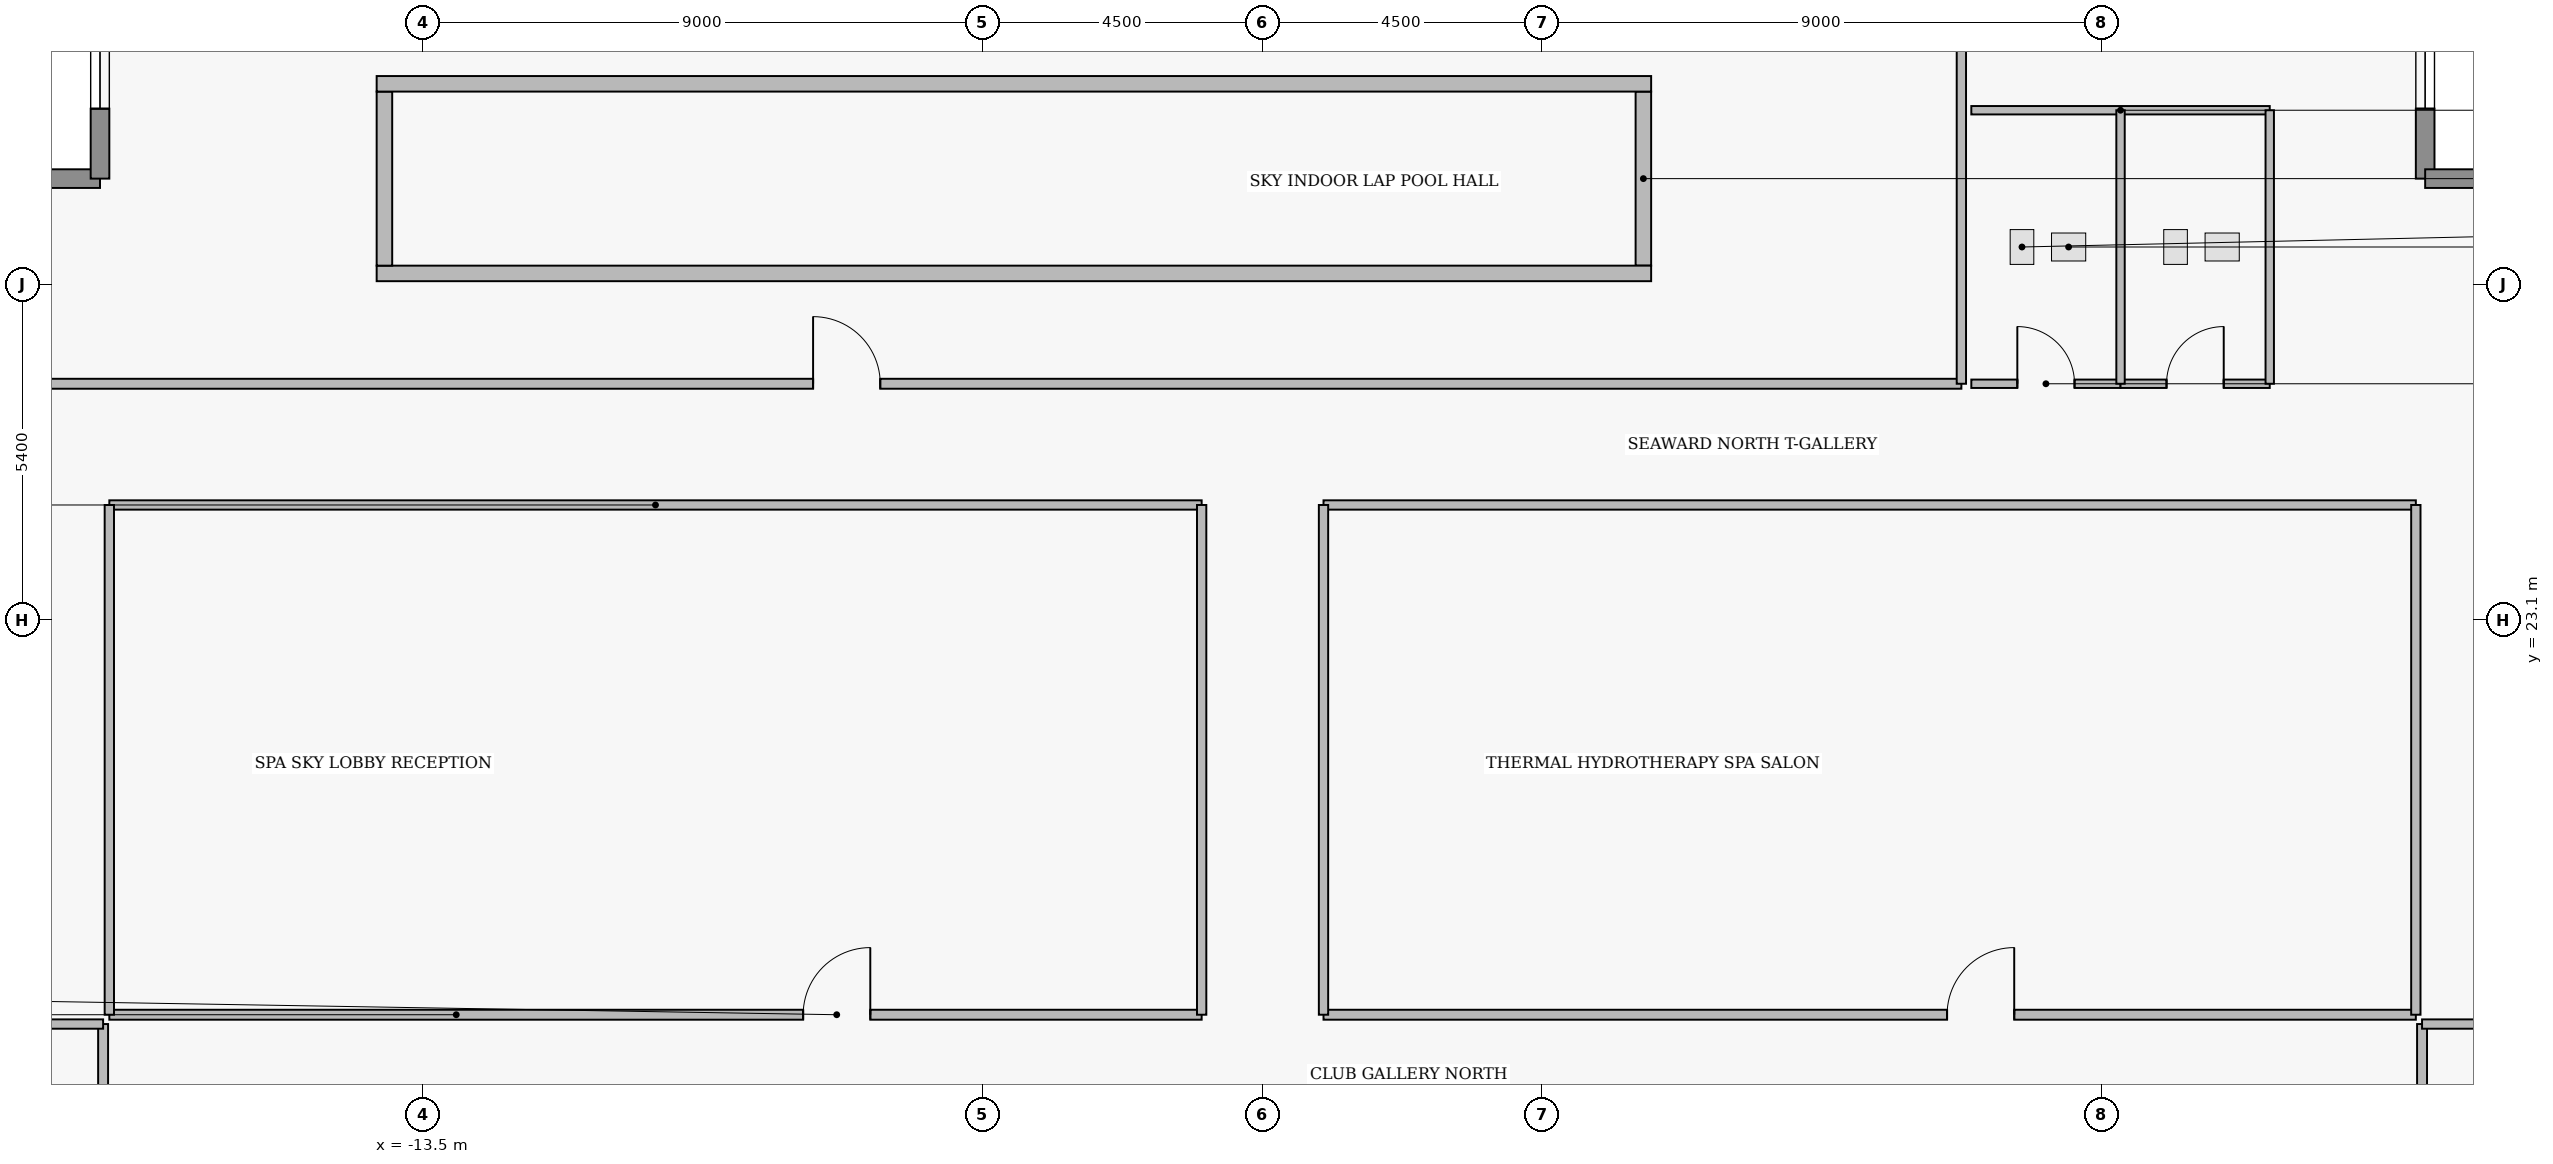
"""IFC4 building model, lengths in metres.
Left out: names, types, materials, properties, quantities, classifications, styles, units other than length and angle.
Written with IfcOpenShell. Run it as: python <this file> out.ifc"""

import sys

from ifc_helpers import new_model, si_unit, direction, frame, frame_2d, origin, place, context, subcontext, project, spatial, rectangle, extrude, element, fill, save


model = new_model("IFC4")
c1 = context("Model", 3, precision=1e-05, world=origin(), true_north=direction((0.0, 1.0)))
c2 = subcontext(c1, "Body", "Model", "MODEL_VIEW")
j1 = project(units=[si_unit("LENGTHUNIT", "METRE"), si_unit("PLANEANGLEUNIT", "RADIAN")], contexts=[c1])
p1 = place(None, origin())
s1 = spatial("IfcSite", under=j1, at=p1, CompositionType="ELEMENT")
p2 = place(p1, origin())
s2 = spatial("IfcBuilding", under=s1, at=p2, CompositionType="ELEMENT")
p3 = place(p2, frame((0.0, 0.0, 168.2)))
s3 = spatial("IfcBuildingStorey", under=s2, at=p3, CompositionType="ELEMENT", Elevation=168.2)
p4 = place(p3, frame((-22.1, 30.2, 0.0), z_axis=(0.0, 0.0, 1.0), x_axis=(1.0, 0.0, 0.0)))
e1 = element("IfcWall", 1, at=p4, inside=s3, PredefinedType="STANDARD", context=c2, shape_type="SweptSolid", body=[
    extrude(rectangle(XDim=3.4, YDim=0.3, at=frame_2d((1.7, 0.0))), origin(), (0.0, 0.0, 1.0), 4.38),
])
p5 = place(p4, frame((1.125, 0.0, 1.25)))
e2 = element("IfcOpeningElement", 2, at=p5, cuts=e1, PredefinedType="OPENING", context=c2, shape_type="SweptSolid", body=[
    extrude(rectangle(XDim=1.15, YDim=1.55, at=frame_2d((0.575, 0.775))), frame((0.0, 0.16, 0.0), z_axis=(0.0, -1.0, 0.0), x_axis=(1.0, 0.0, 0.0)), (0.0, 0.0, 1.0), 0.32),
])
p6 = place(p3, frame((-18.7, 30.2, 0.0), z_axis=(0.0, 0.0, 1.0), x_axis=(0.0, 1.0, 0.0)))
e3 = element("IfcWall", 3, at=p6, inside=s3, PredefinedType="STANDARD", context=c2, shape_type="SweptSolid", body=[
    extrude(rectangle(XDim=3.4, YDim=0.3, at=frame_2d((1.7, 0.0))), origin(), (0.0, 0.0, 1.0), 4.38),
])
p7 = place(p6, frame((1.125, 0.0, 1.25)))
e4 = element("IfcOpeningElement", 4, at=p7, cuts=e3, PredefinedType="OPENING", context=c2, shape_type="SweptSolid", body=[
    extrude(rectangle(XDim=1.15, YDim=1.55, at=frame_2d((0.575, 0.775))), frame((0.0, 0.16, 0.0), z_axis=(0.0, -1.0, 0.0), x_axis=(1.0, 0.0, 0.0)), (0.0, 0.0, 1.0), 0.32),
])
p8 = place(p3, frame((18.7, 33.6, 0.0), z_axis=(0.0, 0.0, 1.0), x_axis=(0.0, -1.0, 0.0)))
e5 = element("IfcWall", 5, at=p8, inside=s3, PredefinedType="STANDARD", context=c2, shape_type="SweptSolid", body=[
    extrude(rectangle(XDim=3.4, YDim=0.3, at=frame_2d((1.7, 0.0))), origin(), (0.0, 0.0, 1.0), 4.38),
])
p9 = place(p8, frame((1.125, 0.0, 1.25)))
e6 = element("IfcOpeningElement", 6, at=p9, cuts=e5, PredefinedType="OPENING", context=c2, shape_type="SweptSolid", body=[
    extrude(rectangle(XDim=1.15, YDim=1.55, at=frame_2d((0.575, 0.775))), frame((0.0, 0.16, 0.0), z_axis=(0.0, -1.0, 0.0), x_axis=(1.0, 0.0, 0.0)), (0.0, 0.0, 1.0), 0.32),
])
p10 = place(p3, frame((18.7, 30.2, 0.0), z_axis=(0.0, 0.0, 1.0), x_axis=(1.0, 0.0, 0.0)))
e7 = element("IfcWall", 7, at=p10, inside=s3, PredefinedType="STANDARD", context=c2, shape_type="SweptSolid", body=[
    extrude(rectangle(XDim=3.4, YDim=0.3, at=frame_2d((1.7, 0.0))), origin(), (0.0, 0.0, 1.0), 4.38),
])
p11 = place(p10, frame((1.125, 0.0, 1.25)))
e8 = element("IfcOpeningElement", 8, at=p11, cuts=e7, PredefinedType="OPENING", context=c2, shape_type="SweptSolid", body=[
    extrude(rectangle(XDim=1.15, YDim=1.55, at=frame_2d((0.575, 0.775))), frame((0.0, 0.16, 0.0), z_axis=(0.0, -1.0, 0.0), x_axis=(1.0, 0.0, 0.0)), (0.0, 0.0, 1.0), 0.32),
])
p12 = place(p3, frame((-18.55, 16.75, 0.0), z_axis=(0.0, 0.0, 1.0), x_axis=(1.0, 0.0, 0.0)))
e9 = element("IfcWall", 9, at=p12, inside=s3, PredefinedType="PARTITIONING", context=c2, shape_type="SweptSolid", body=[
    extrude(rectangle(XDim=17.57, YDim=0.16, at=frame_2d((8.785, 0.0))), origin(), (0.0, 0.0, 1.0), 3.974),
])
p13 = place(p12, frame((11.16, 0.0, 0.0)))
e10 = element("IfcOpeningElement", 10, at=p13, cuts=e9, PredefinedType="OPENING", context=c2, shape_type="SweptSolid", body=[
    extrude(rectangle(XDim=1.08, YDim=2.18, at=frame_2d((0.54, 1.09))), frame((0.0, 0.09, 0.0), z_axis=(0.0, -1.0, 0.0), x_axis=(1.0, 0.0, 0.0)), (0.0, 0.0, 1.0), 0.18),
])
p14 = place(p3, frame((-22.04, 26.9, 0.0), z_axis=(0.0, 0.0, 1.0), x_axis=(1.0, 0.0, 0.0)))
e11 = element("IfcWall", 11, at=p14, inside=s3, PredefinedType="PARTITIONING", context=c2, shape_type="SweptSolid", body=[
    extrude(rectangle(XDim=33.28, YDim=0.16, at=frame_2d((16.64, 0.0))), origin(), (0.0, 0.0, 1.0), 4.38),
])
p15 = place(p14, frame((14.81, 0.0, 0.0)))
e12 = element("IfcOpeningElement", 12, at=p15, cuts=e11, PredefinedType="OPENING", context=c2, shape_type="SweptSolid", body=[
    extrude(rectangle(XDim=1.08, YDim=2.18, at=frame_2d((0.54, 1.09))), frame((0.0, 0.09, 0.0), z_axis=(0.0, -1.0, 0.0), x_axis=(1.0, 0.0, 0.0)), (0.0, 0.0, 1.0), 0.18),
])
p16 = place(p3, frame((0.98, 16.75, 0.0), z_axis=(0.0, 0.0, 1.0), x_axis=(1.0, 0.0, 0.0)))
e13 = element("IfcWall", 13, at=p16, inside=s3, PredefinedType="PARTITIONING", context=c2, shape_type="SweptSolid", body=[
    extrude(rectangle(XDim=17.57, YDim=0.16, at=frame_2d((8.785, 0.0))), origin(), (0.0, 0.0, 1.0), 3.974),
])
p17 = place(p16, frame((10.03, 0.0, 0.0)))
e14 = element("IfcOpeningElement", 14, at=p17, cuts=e13, PredefinedType="OPENING", context=c2, shape_type="SweptSolid", body=[
    extrude(rectangle(XDim=1.08, YDim=2.18, at=frame_2d((0.54, 1.09))), frame((0.0, 0.09, 0.0), z_axis=(0.0, -1.0, 0.0), x_axis=(1.0, 0.0, 0.0)), (0.0, 0.0, 1.0), 0.18),
])
p18 = place(p3, frame((-18.65, 1.55, 0.0), z_axis=(0.0, 0.0, 1.0), x_axis=(0.0, 1.0, 0.0)))
e15 = element("IfcWall", 15, at=p18, inside=s3, PredefinedType="PARTITIONING", context=c2, shape_type="SweptSolid", body=[
    extrude(rectangle(XDim=15.05, YDim=0.16, at=frame_2d((7.525, 0.0))), origin(), (0.0, 0.0, 1.0), 4.38),
])
p19 = place(p18, frame((6.985, 0.0, 0.0)))
e16 = element("IfcOpeningElement", 16, at=p19, cuts=e15, PredefinedType="OPENING", context=c2, shape_type="SweptSolid", body=[
    extrude(rectangle(XDim=1.08, YDim=2.18, at=frame_2d((0.54, 1.09))), frame((0.0, 0.09, 0.0), z_axis=(0.0, -1.0, 0.0), x_axis=(1.0, 0.0, 0.0)), (0.0, 0.0, 1.0), 0.18),
])
p20 = place(p3, frame((18.65, 1.55, 0.0), z_axis=(0.0, 0.0, 1.0), x_axis=(0.0, 1.0, 0.0)))
e17 = element("IfcWall", 17, at=p20, inside=s3, PredefinedType="PARTITIONING", context=c2, shape_type="SweptSolid", body=[
    extrude(rectangle(XDim=15.05, YDim=0.16, at=frame_2d((7.525, 0.0))), origin(), (0.0, 0.0, 1.0), 4.38),
])
p21 = place(p20, frame((6.985, 0.0, 0.0)))
e18 = element("IfcOpeningElement", 18, at=p21, cuts=e17, PredefinedType="OPENING", context=c2, shape_type="SweptSolid", body=[
    extrude(rectangle(XDim=1.08, YDim=2.18, at=frame_2d((0.54, 1.09))), frame((0.0, 0.09, 0.0), z_axis=(0.0, -1.0, 0.0), x_axis=(1.0, 0.0, 0.0)), (0.0, 0.0, 1.0), 0.18),
])
p22 = place(p3, frame((11.4, 26.9, 0.0), z_axis=(0.0, 0.0, 1.0), x_axis=(1.0, 0.0, 0.0)))
e19 = element("IfcWall", 19, at=p22, inside=s3, PredefinedType="PLUMBINGWALL", context=c2, shape_type="SweptSolid", body=[
    extrude(rectangle(XDim=2.4, YDim=0.135, at=frame_2d((1.2, 0.0))), origin(), (0.0, 0.0, 1.0), 4.38),
])
p23 = place(p22, frame((0.74, 0.0, 0.0)))
e20 = element("IfcOpeningElement", 20, at=p23, cuts=e19, PredefinedType="OPENING", context=c2, shape_type="SweptSolid", body=[
    extrude(rectangle(XDim=0.92, YDim=2.12, at=frame_2d((0.46, 1.06))), frame((0.0, 0.077, 0.0), z_axis=(0.0, -1.0, 0.0), x_axis=(1.0, 0.0, 0.0)), (0.0, 0.0, 1.0), 0.155),
])
p24 = place(p3, frame((13.8, 26.9, 0.0), z_axis=(0.0, 0.0, 1.0), x_axis=(1.0, 0.0, 0.0)))
e21 = element("IfcWall", 21, at=p24, inside=s3, PredefinedType="PLUMBINGWALL", context=c2, shape_type="SweptSolid", body=[
    extrude(rectangle(XDim=2.4, YDim=0.135, at=frame_2d((1.2, 0.0))), origin(), (0.0, 0.0, 1.0), 4.38),
])
p25 = place(p24, frame((0.74, 0.0, 0.0)))
e22 = element("IfcOpeningElement", 22, at=p25, cuts=e21, PredefinedType="OPENING", context=c2, shape_type="SweptSolid", body=[
    extrude(rectangle(XDim=0.92, YDim=2.12, at=frame_2d((0.46, 1.06))), frame((0.0, 0.077, 0.0), z_axis=(0.0, -1.0, 0.0), x_axis=(1.0, 0.0, 0.0)), (0.0, 0.0, 1.0), 0.155),
])
p26 = place(p3, frame((-18.55, 24.95, 0.0), z_axis=(0.0, 0.0, 1.0), x_axis=(1.0, 0.0, 0.0)))
e23 = element("IfcWall", 23, at=p26, inside=s3, PredefinedType="PARTITIONING", context=c2, shape_type="SweptSolid", body=[
    extrude(rectangle(XDim=17.57, YDim=0.15, at=frame_2d((8.785, 0.0))), origin(), (0.0, 0.0, 1.0), 3.974),
])
for number, where, z_axis, x_axis in (
    (24, (-18.55, 16.75, 0.0), (0.0, 0.0, 1.0), (0.0, 1.0, 0.0)),
    (25, (-0.98, 16.75, 0.0), (0.0, 0.0, 1.0), (0.0, 1.0, 0.0)),
):
    element("IfcWall", number, at=place(p3, frame(where, z_axis=z_axis, x_axis=x_axis)), inside=s3, PredefinedType="PARTITIONING", context=c2, shape_type="SweptSolid", body=[
        extrude(rectangle(XDim=8.2, YDim=0.15, at=frame_2d((4.1, 0.0))), origin(), (0.0, 0.0, 1.0), 4.38),
    ])
p27 = place(p3, frame((11.24, 26.9, 0.0), z_axis=(0.0, 0.0, 1.0), x_axis=(0.0, 1.0, 0.0)))
e26 = element("IfcWall", 26, at=p27, inside=s3, PredefinedType="PARTITIONING", context=c2, shape_type="SweptSolid", body=[
    extrude(rectangle(XDim=6.64, YDim=0.15, at=frame_2d((3.32, 0.0))), origin(), (0.0, 0.0, 1.0), 4.38),
])
p28 = place(p3, frame((0.98, 24.95, 0.0), z_axis=(0.0, 0.0, 1.0), x_axis=(1.0, 0.0, 0.0)))
e27 = element("IfcWall", 27, at=p28, inside=s3, PredefinedType="PARTITIONING", context=c2, shape_type="SweptSolid", body=[
    extrude(rectangle(XDim=17.57, YDim=0.15, at=frame_2d((8.785, 0.0))), origin(), (0.0, 0.0, 1.0), 3.974),
])
for number, where, z_axis, x_axis in (
    (28, (0.98, 16.75, 0.0), (0.0, 0.0, 1.0), (0.0, 1.0, 0.0)),
    (29, (18.55, 16.75, 0.0), (0.0, 0.0, 1.0), (0.0, 1.0, 0.0)),
):
    element("IfcWall", number, at=place(p3, frame(where, z_axis=z_axis, x_axis=x_axis)), inside=s3, PredefinedType="PARTITIONING", context=c2, shape_type="SweptSolid", body=[
        extrude(rectangle(XDim=8.2, YDim=0.15, at=frame_2d((4.1, 0.0))), origin(), (0.0, 0.0, 1.0), 4.38),
    ])
for number, where, z_axis, x_axis in (
    (30, (-22.69, 16.6, 0.0), (0.0, 0.0, 1.0), (1.0, 0.0, 0.0)),
    (31, (18.65, 16.6, 0.0), (0.0, 0.0, 1.0), (1.0, 0.0, 0.0)),
):
    element("IfcWall", number, at=place(p3, frame(where, z_axis=z_axis, x_axis=x_axis)), inside=s3, PredefinedType="PARTITIONING", context=c2, shape_type="SweptSolid", body=[
        extrude(rectangle(XDim=4.04, YDim=0.15, at=frame_2d((2.02, 0.0))), origin(), (0.0, 0.0, 1.0), 4.38),
    ])
p29 = place(p3, frame((11.4, 31.3, 0.0), z_axis=(0.0, 0.0, 1.0), x_axis=(1.0, 0.0, 0.0)))
e32 = element("IfcWall", 32, at=p29, inside=s3, PredefinedType="PLUMBINGWALL", context=c2, shape_type="SweptSolid", body=[
    extrude(rectangle(XDim=4.8, YDim=0.135, at=frame_2d((2.4, 0.0))), origin(), (0.0, 0.0, 1.0), 4.38),
])
p30 = place(p3, frame((16.2, 26.9, 0.0), z_axis=(0.0, 0.0, 1.0), x_axis=(0.0, 1.0, 0.0)))
e33 = element("IfcWall", 33, at=p30, inside=s3, PredefinedType="PLUMBINGWALL", context=c2, shape_type="SweptSolid", body=[
    extrude(rectangle(XDim=4.4, YDim=0.135, at=frame_2d((2.2, 0.0))), origin(), (0.0, 0.0, 1.0), 4.38),
])
p31 = place(p3, frame((13.8, 26.9, 0.0), z_axis=(0.0, 0.0, 1.0), x_axis=(0.0, 1.0, 0.0)))
e34 = element("IfcWall", 34, at=p31, inside=s3, PredefinedType="PLUMBINGWALL", context=c2, shape_type="SweptSolid", body=[
    extrude(rectangle(XDim=4.4, YDim=0.135, at=frame_2d((2.2, 0.0))), origin(), (0.0, 0.0, 1.0), 3.369),
])
p32 = place(p3, frame((6.125, 28.8, 0.0), z_axis=(0.0, 0.0, 1.0), x_axis=(0.0, 1.0, 0.0)))
e35 = element("IfcWall", 35, at=p32, inside=s3, PredefinedType="STANDARD", context=c2, shape_type="SweptSolid", body=[
    extrude(rectangle(XDim=2.8, YDim=0.25, at=frame_2d((1.4, 0.0))), origin(), (0.0, 0.0, 1.0), 1.6),
])
p33 = place(p3, frame((-14.25, 28.675, 0.0), z_axis=(0.0, 0.0, 1.0), x_axis=(1.0, 0.0, 0.0)))
e36 = element("IfcWall", 36, at=p33, inside=s3, PredefinedType="STANDARD", context=c2, shape_type="SweptSolid", body=[
    extrude(rectangle(XDim=20.5, YDim=0.25, at=frame_2d((10.25, 0.0))), origin(), (0.0, 0.0, 1.0), 1.6),
])
p34 = place(p3, frame((-14.125, 28.8, 0.0), z_axis=(0.0, 0.0, 1.0), x_axis=(0.0, 1.0, 0.0)))
e37 = element("IfcWall", 37, at=p34, inside=s3, PredefinedType="STANDARD", context=c2, shape_type="SweptSolid", body=[
    extrude(rectangle(XDim=2.8, YDim=0.25, at=frame_2d((1.4, 0.0))), origin(), (0.0, 0.0, 1.0), 1.6),
])
p35 = place(p3, frame((-14.25, 31.725, 0.0), z_axis=(0.0, 0.0, 1.0), x_axis=(1.0, 0.0, 0.0)))
e38 = element("IfcWall", 38, at=p35, inside=s3, PredefinedType="STANDARD", context=c2, shape_type="SweptSolid", body=[
    extrude(rectangle(XDim=20.5, YDim=0.25, at=frame_2d((10.25, 0.0))), origin(), (0.0, 0.0, 1.0), 1.6),
])
p36 = place(p7, origin())
e39 = element("IfcWindow", 39, at=p36, inside=s3, PartitioningType="SINGLE_PANEL", PredefinedType="WINDOW", context=c2, shape_type="SweptSolid", body=[
    extrude(rectangle(XDim=1.15, YDim=1.55, at=frame_2d((0.575, 0.775))), frame((0.0, 0.03, 0.0), z_axis=(0.0, -1.0, 0.0), x_axis=(1.0, 0.0, 0.0)), (0.0, 0.0, 1.0), 0.06),
])
fill(e4, e39)
p37 = place(p9, origin())
e40 = element("IfcWindow", 40, at=p37, inside=s3, PartitioningType="SINGLE_PANEL", PredefinedType="WINDOW", context=c2, shape_type="SweptSolid", body=[
    extrude(rectangle(XDim=1.15, YDim=1.55, at=frame_2d((0.575, 0.775))), frame((0.0, 0.03, 0.0), z_axis=(0.0, -1.0, 0.0), x_axis=(1.0, 0.0, 0.0)), (0.0, 0.0, 1.0), 0.06),
])
fill(e6, e40)
p38 = place(p13, origin())
e41 = element("IfcDoor", 41, at=p38, inside=s3, OperationType="SINGLE_SWING_RIGHT", PredefinedType="DOOR", context=c2, shape_type="SweptSolid", body=[
    extrude(rectangle(XDim=1.08, YDim=2.18, at=frame_2d((0.54, 1.09))), frame((0.0, 0.025, 0.0), z_axis=(0.0, -1.0, 0.0), x_axis=(1.0, 0.0, 0.0)), (0.0, 0.0, 1.0), 0.05),
])
fill(e10, e41)
p39 = place(p15, origin())
e42 = element("IfcDoor", 42, at=p39, inside=s3, OperationType="SINGLE_SWING_LEFT", PredefinedType="DOOR", context=c2, shape_type="SweptSolid", body=[
    extrude(rectangle(XDim=1.08, YDim=2.18, at=frame_2d((0.54, 1.09))), frame((0.0, 0.025, 0.0), z_axis=(0.0, -1.0, 0.0), x_axis=(1.0, 0.0, 0.0)), (0.0, 0.0, 1.0), 0.05),
])
fill(e12, e42)
p40 = place(p17, origin())
e43 = element("IfcDoor", 43, at=p40, inside=s3, OperationType="SINGLE_SWING_RIGHT", PredefinedType="DOOR", context=c2, shape_type="SweptSolid", body=[
    extrude(rectangle(XDim=1.08, YDim=2.18, at=frame_2d((0.54, 1.09))), frame((0.0, 0.025, 0.0), z_axis=(0.0, -1.0, 0.0), x_axis=(1.0, 0.0, 0.0)), (0.0, 0.0, 1.0), 0.05),
])
fill(e14, e43)
p41 = place(p23, origin())
e44 = element("IfcDoor", 44, at=p41, inside=s3, OperationType="SINGLE_SWING_LEFT", PredefinedType="DOOR", context=c2, shape_type="SweptSolid", body=[
    extrude(rectangle(XDim=0.92, YDim=2.12, at=frame_2d((0.46, 1.06))), frame((0.0, 0.025, 0.0), z_axis=(0.0, -1.0, 0.0), x_axis=(1.0, 0.0, 0.0)), (0.0, 0.0, 1.0), 0.05),
])
fill(e20, e44)
p42 = place(p25, origin())
e45 = element("IfcDoor", 45, at=p42, inside=s3, OperationType="SINGLE_SWING_RIGHT", PredefinedType="DOOR", context=c2, shape_type="SweptSolid", body=[
    extrude(rectangle(XDim=0.92, YDim=2.12, at=frame_2d((0.46, 1.06))), frame((0.0, 0.025, 0.0), z_axis=(0.0, -1.0, 0.0), x_axis=(1.0, 0.0, 0.0)), (0.0, 0.0, 1.0), 0.05),
])
fill(e22, e45)
save(model, sys.argv[1])
